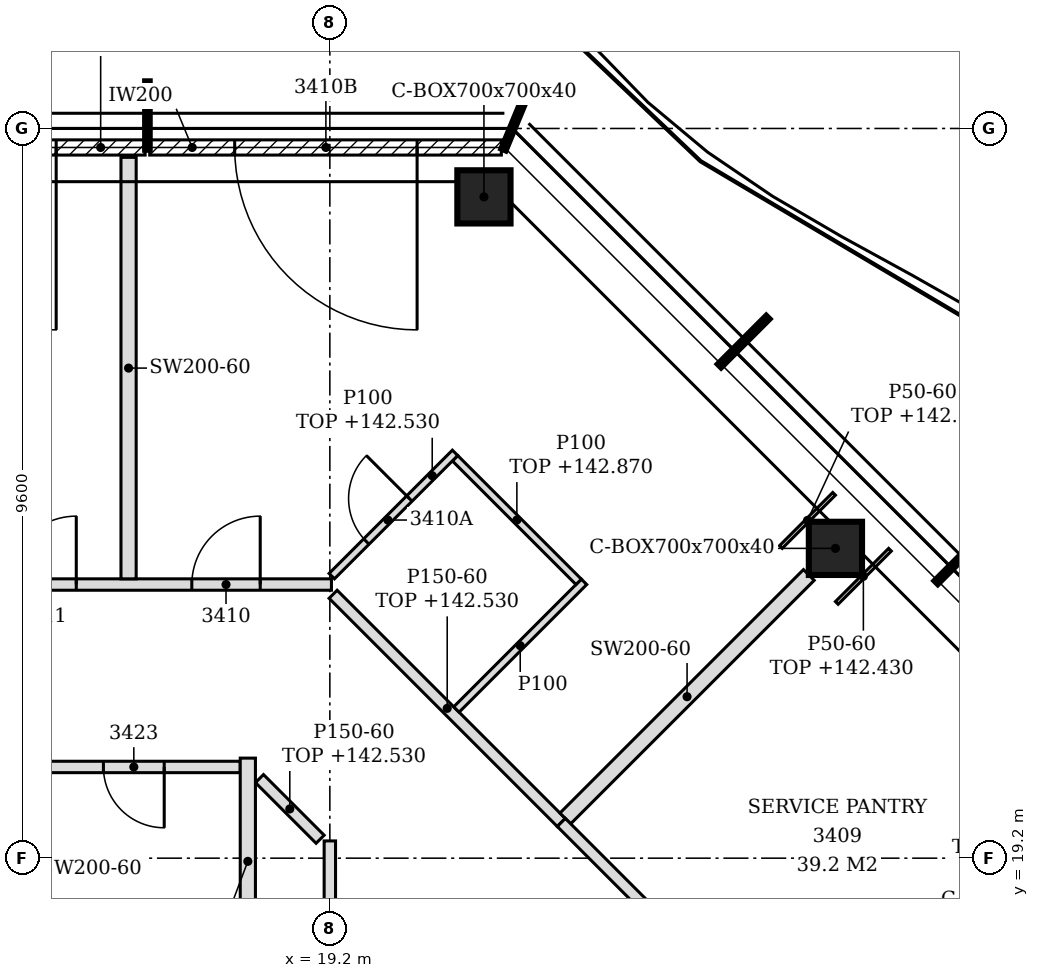
"""IFC4 building model, lengths in metres.
Left out: names, types, materials, properties, quantities, classifications, styles, units other than length and angle.
Written with IfcOpenShell. Run it as: python <this file> out.ifc"""

import sys

from ifc_helpers import new_model, si_unit, direction, frame, frame_2d, origin, origin_2d, place, context, subcontext, project, spatial, polyline, rectangle, hollow_rectangle, outline, extrude, element, fill, save


model = new_model("IFC4")
c1 = context("Model", 3, precision=1e-05, world=origin(), true_north=direction((0.0, 1.0)))
c2 = subcontext(c1, "Body", "Model", "MODEL_VIEW")
j1 = project(units=[si_unit("LENGTHUNIT", "METRE"), si_unit("PLANEANGLEUNIT", "RADIAN")], contexts=[c1])
p1 = place(None, origin())
s1 = spatial("IfcSite", under=j1, at=p1, CompositionType="ELEMENT")
p2 = place(p1, origin())
s2 = spatial("IfcBuilding", under=s1, at=p2, CompositionType="ELEMENT")
p3 = place(p2, frame((0.0, 0.0, 139.8)))
s3 = spatial("IfcBuildingStorey", under=s2, at=p3, CompositionType="ELEMENT", Elevation=139.8)
for number, where, z_axis, x_axis in (
    (1, (25.852, 23.276, -0.15), (0.0, 0.0, 1.0), (1.0, 0.0, 0.0)),
    (2, (21.227, 27.9, -0.15), (0.0, 0.0, 1.0), (1.0, 0.0, 0.0)),
):
    element("IfcColumn", number, at=place(p3, frame(where, z_axis=z_axis, x_axis=x_axis)), inside=s3, PredefinedType="COLUMN", context=c2, shape_type="SweptSolid", body=[
        extrude(hollow_rectangle(XDim=0.7, YDim=0.7, WallThickness=0.04, at=origin_2d()), origin(), (0.0, 0.0, 1.0), 3.6),
    ])
p4 = place(p3, frame((21.457, 28.55, 0.0), z_axis=(0.0, 0.0, 1.0), x_axis=(-1.0, 0.0, 0.0)))
e3 = element("IfcWall", 3, at=p4, inside=s3, PredefinedType="NOTDEFINED", context=c2, shape_type="SweptSolid", body=[
    extrude(rectangle(XDim=4.626, YDim=0.2, at=frame_2d((2.313, 0.0))), origin(), (0.0, 0.0, 1.0), 3.45),
])
p5 = place(p4, frame((1.108, 0.0, 0.0)))
e4 = element("IfcOpeningElement", 4, at=p5, cuts=e3, PredefinedType="OPENING", context=c2, shape_type="SweptSolid", body=[
    extrude(rectangle(XDim=2.4, YDim=2.4, at=frame_2d((1.2, 1.2))), frame((0.0, 0.11, 0.0), z_axis=(0.0, -1.0, 0.0), x_axis=(1.0, 0.0, 0.0)), (0.0, 0.0, 1.0), 0.22),
])
p6 = place(p3, frame((16.77, 28.55, 0.0), z_axis=(0.0, 0.0, 1.0), x_axis=(-1.0, 0.0, 0.0)))
e5 = element("IfcWall", 5, at=p6, inside=s3, PredefinedType="NOTDEFINED", context=c2, shape_type="SweptSolid", body=[
    extrude(rectangle(XDim=4.74, YDim=0.2, at=frame_2d((2.37, 0.0))), origin(), (0.0, 0.0, 1.0), 3.45),
])
p7 = place(p6, frame((1.17, 0.0, 0.0)))
e6 = element("IfcOpeningElement", 6, at=p7, cuts=e5, PredefinedType="OPENING", context=c2, shape_type="SweptSolid", body=[
    extrude(rectangle(XDim=2.4, YDim=2.4, at=frame_2d((1.2, 1.2))), frame((0.0, 0.11, 0.0), z_axis=(0.0, -1.0, 0.0), x_axis=(1.0, 0.0, 0.0)), (0.0, 0.0, 1.0), 0.22),
])
p8 = place(p3, frame((26.869, 15.045, 0.0), z_axis=(0.0, 0.0, 1.0), x_axis=(-0.707013447311, 0.707200102744, 0.0)))
e7 = element("IfcWall", 7, at=p8, inside=s3, PredefinedType="PARTITIONING", context=c2, shape_type="SweptSolid", body=[
    extrude(rectangle(XDim=6.54, YDim=0.15, at=frame_2d((3.27, 0.0))), origin(), (0.0, 0.0, 1.0), 2.93),
])
p9 = place(p8, frame((2.82, 0.0, 0.0)))
e8 = element("IfcOpeningElement", 8, at=p9, cuts=e7, PredefinedType="OPENING", context=c2, shape_type="SweptSolid", body=[
    extrude(rectangle(XDim=0.9, YDim=2.1, at=frame_2d((0.45, 1.05))), frame((0.0, 0.085, 0.0), z_axis=(0.0, -1.0, 0.0), x_axis=(1.0, 0.0, 0.0)), (0.0, 0.0, 1.0), 0.17),
])
p10 = place(p3, frame((19.2, 15.502, 0.0), z_axis=(0.0, 0.0, 1.0), x_axis=(0.0, 1.0, 0.0)))
e9 = element("IfcWall", 9, at=p10, inside=s3, PredefinedType="PARTITIONING", context=c2, shape_type="SweptSolid", body=[
    extrude(rectangle(XDim=3.925, YDim=0.15, at=frame_2d((1.962, 0.0))), origin(), (0.0, 0.0, 1.0), 2.73),
])
p11 = place(p3, frame((18.121, 17.8, 0.0), z_axis=(0.0, 0.0, 1.0), x_axis=(0.0, 1.0, 0.0)))
e10 = element("IfcWall", 10, at=p11, inside=s3, PredefinedType="PARTITIONING", context=c2, shape_type="SweptSolid", body=[
    extrude(outline(polyline([(0.0, 0.0), (2.716, 0.0), (2.716, 3.45), (1.505, 3.45), (1.503, 2.88), (1.295, 2.88), (1.293, 3.45), (0.0, 3.45), (0.0, 0.0)])), frame((0.0, 0.1, 0.0), z_axis=(0.0, -1.0, 0.0), x_axis=(1.0, 0.0, 0.0)), (0.0, 0.0, 1.0), 0.2),
])
p12 = place(p3, frame((19.072, 19.449, 0.0), z_axis=(0.0, 0.0, 1.0), x_axis=(-0.707106781187, 0.707106781187, 0.0)))
e11 = element("IfcWall", 11, at=p12, inside=s3, PredefinedType="PARTITIONING", context=c2, shape_type="SweptSolid", body=[
    extrude(rectangle(XDim=1.128, YDim=0.15, at=frame_2d((0.564, 0.0))), origin(), (0.0, 0.0, 1.0), 2.73),
])
p13 = place(p3, frame((22.245, 19.67, 0.0), z_axis=(0.0, 0.0, 1.0), x_axis=(-0.707106781187, 0.707106781187, 0.0)))
e12 = element("IfcWall", 12, at=p13, inside=s3, PredefinedType="PARTITIONING", context=c2, shape_type="SweptSolid", body=[
    extrude(rectangle(XDim=4.246, YDim=0.15, at=frame_2d((2.123, 0.0))), origin(), (0.0, 0.0, 1.0), 2.73),
])
p14 = place(p3, frame((22.298, 19.723, 0.0), z_axis=(0.0, 0.0, 1.0), x_axis=(0.707160674466, 0.707052883799, 0.0)))
e13 = element("IfcWall", 13, at=p14, inside=s3, PredefinedType="PARTITIONING", context=c2, shape_type="SweptSolid", body=[
    extrude(rectangle(XDim=4.53, YDim=0.2, at=frame_2d((2.265, 0.0))), origin(), (0.0, 0.0, 1.0), 3.45),
])
p15 = place(p3, frame((7.125, 20.4, 0.0), z_axis=(0.0, 0.0, 1.0), x_axis=(1.0, 0.0, 0.0)))
e14 = element("IfcWall", 14, at=p15, inside=s3, PredefinedType="PARTITIONING", context=c2, shape_type="SweptSolid", body=[
    extrude(outline(polyline([(0.0, 0.0), (10.896, 0.0), (10.896, 3.45), (0.225, 3.45), (0.223, 2.73), (0.0, 2.73), (0.0, 0.0)])), frame((0.0, 0.075, 0.0), z_axis=(0.0, -1.0, 0.0), x_axis=(1.0, 0.0, 0.0)), (0.0, 0.0, 1.0), 0.15),
])
p16 = place(p15, frame((9.096, 0.0, 0.0)))
e15 = element("IfcOpeningElement", 15, at=p16, cuts=e14, PredefinedType="OPENING", context=c2, shape_type="SweptSolid", body=[
    extrude(rectangle(XDim=0.8, YDim=2.1, at=frame_2d((0.4, 1.05))), frame((0.0, 0.085, 0.0), z_axis=(0.0, -1.0, 0.0), x_axis=(1.0, 0.0, 0.0)), (0.0, 0.0, 1.0), 0.17),
])
p17 = place(p3, frame((20.865, 21.156, 0.0), z_axis=(0.0, 0.0, 1.0), x_axis=(0.707106781187, 0.707106781187, 0.0)))
e16 = element("IfcWall", 16, at=p17, inside=s3, PredefinedType="PARTITIONING", context=c2, shape_type="SweptSolid", body=[
    extrude(rectangle(XDim=2.375, YDim=0.1, at=frame_2d((1.188, 0.0))), origin(), (0.0, 0.0, 1.0), 3.45),
])
p18 = place(p3, frame((-4.821, 22.8, 0.0), z_axis=(0.0, 0.0, 1.0), x_axis=(1.0, 0.0, 0.0)))
e17 = element("IfcWall", 17, at=p18, inside=s3, PredefinedType="PARTITIONING", context=c2, shape_type="SweptSolid", body=[
    extrude(outline(polyline([(0.0, 0.0), (24.042, 0.0), (24.042, 2.73), (23.871, 2.73), (23.869, 3.45), (12.171, 3.45), (12.169, 2.73), (11.871, 2.73), (11.869, 3.45), (0.171, 3.45), (0.169, 2.73), (0.0, 2.73), (0.0, 0.0)])), frame((0.0, 0.075, 0.0), z_axis=(0.0, -1.0, 0.0), x_axis=(1.0, 0.0, 0.0)), (0.0, 0.0, 1.0), 0.15),
])
p19 = place(p18, frame((22.205, 0.0, 0.0)))
e18 = element("IfcOpeningElement", 18, at=p19, cuts=e17, PredefinedType="OPENING", context=c2, shape_type="SweptSolid", body=[
    extrude(rectangle(XDim=0.9, YDim=2.1, at=frame_2d((0.45, 1.05))), frame((0.0, 0.085, 0.0), z_axis=(0.0, -1.0, 0.0), x_axis=(1.0, 0.0, 0.0)), (0.0, 0.0, 1.0), 0.17),
])
p20 = place(p18, frame((19.785, 0.0, 0.0)))
e19 = element("IfcOpeningElement", 19, at=p20, cuts=e17, PredefinedType="OPENING", context=c2, shape_type="SweptSolid", body=[
    extrude(rectangle(XDim=0.9, YDim=2.1, at=frame_2d((0.45, 1.05))), frame((0.0, 0.085, 0.0), z_axis=(0.0, -1.0, 0.0), x_axis=(1.0, 0.0, 0.0)), (0.0, 0.0, 1.0), 0.17),
])
p21 = place(p18, frame((15.109, 0.0, 0.0)))
e20 = element("IfcOpeningElement", 20, at=p21, cuts=e17, PredefinedType="OPENING", context=c2, shape_type="SweptSolid", body=[
    extrude(rectangle(XDim=0.9, YDim=2.1, at=frame_2d((0.45, 1.05))), frame((0.0, 0.085, 0.0), z_axis=(0.0, -1.0, 0.0), x_axis=(1.0, 0.0, 0.0)), (0.0, 0.0, 1.0), 0.17),
])
p22 = place(p18, frame((10.433, 0.0, 0.0)))
e21 = element("IfcOpeningElement", 21, at=p22, cuts=e17, PredefinedType="OPENING", context=c2, shape_type="SweptSolid", body=[
    extrude(rectangle(XDim=0.9, YDim=2.1, at=frame_2d((0.45, 1.05))), frame((0.0, 0.085, 0.0), z_axis=(0.0, -1.0, 0.0), x_axis=(1.0, 0.0, 0.0)), (0.0, 0.0, 1.0), 0.17),
])
p23 = place(p18, frame((5.757, 0.0, 0.0)))
e22 = element("IfcOpeningElement", 22, at=p23, cuts=e17, PredefinedType="OPENING", context=c2, shape_type="SweptSolid", body=[
    extrude(rectangle(XDim=0.9, YDim=2.1, at=frame_2d((0.45, 1.05))), frame((0.0, 0.085, 0.0), z_axis=(0.0, -1.0, 0.0), x_axis=(1.0, 0.0, 0.0)), (0.0, 0.0, 1.0), 0.17),
])
p24 = place(p18, frame((0.938, 0.0, 0.0)))
e23 = element("IfcOpeningElement", 23, at=p24, cuts=e17, PredefinedType="OPENING", context=c2, shape_type="SweptSolid", body=[
    extrude(rectangle(XDim=0.9, YDim=2.1, at=frame_2d((0.45, 1.05))), frame((0.0, 0.085, 0.0), z_axis=(0.0, -1.0, 0.0), x_axis=(1.0, 0.0, 0.0)), (0.0, 0.0, 1.0), 0.17),
])
p25 = place(p3, frame((22.474, 22.835, 0.0), z_axis=(0.0, 0.0, 1.0), x_axis=(-0.707106781187, 0.707106781187, 0.0)))
e24 = element("IfcWall", 24, at=p25, inside=s3, PredefinedType="PARTITIONING", context=c2, shape_type="SweptSolid", body=[
    extrude(rectangle(XDim=2.3, YDim=0.1, at=frame_2d((1.15, 0.0))), origin(), (0.0, 0.0, 1.0), 3.07),
])
p26 = place(p3, frame((16.552, 22.875, 0.0), z_axis=(0.0, 0.0, 1.0), x_axis=(0.0, 1.0, 0.0)))
e25 = element("IfcWall", 25, at=p26, inside=s3, PredefinedType="PARTITIONING", context=c2, shape_type="SweptSolid", body=[
    extrude(outline(polyline([(0.0, 0.0), (5.545, 0.0), (5.545, 3.45), (5.175, 3.45), (5.173, 2.93), (4.875, 2.93), (4.873, 3.45), (1.23, 3.45), (1.228, 2.88), (1.02, 2.88), (1.018, 3.45), (0.0, 3.45), (0.0, 0.0)])), frame((0.0, 0.1, 0.0), z_axis=(0.0, -1.0, 0.0), x_axis=(1.0, 0.0, 0.0)), (0.0, 0.0, 1.0), 0.2),
])
p27 = place(p3, frame((19.225, 22.91, 0.0), z_axis=(0.0, 0.0, 1.0), x_axis=(0.707106781187, 0.707106781187, 0.0)))
e26 = element("IfcWall", 26, at=p27, inside=s3, PredefinedType="PARTITIONING", context=c2, shape_type="SweptSolid", body=[
    extrude(rectangle(XDim=2.294, YDim=0.1, at=frame_2d((1.147, 0.0))), origin(), (0.0, 0.0, 1.0), 2.73),
])
p28 = place(p27, frame((0.644, 0.0, 0.0)))
e27 = element("IfcOpeningElement", 27, at=p28, cuts=e26, PredefinedType="OPENING", context=c2, shape_type="SweptSolid", body=[
    extrude(rectangle(XDim=0.8, YDim=2.1, at=frame_2d((0.4, 1.05))), frame((0.0, 0.06, 0.0), z_axis=(0.0, -1.0, 0.0), x_axis=(1.0, 0.0, 0.0)), (0.0, 0.0, 1.0), 0.12),
])
p29 = place(p3, frame((25.134, 23.293, 0.0), z_axis=(0.0, 0.0, 1.0), x_axis=(0.707230067171, 0.706983473703, 0.0)))
e28 = element("IfcWall", 28, at=p29, inside=s3, PredefinedType="PARTITIONING", context=c2, shape_type="SweptSolid", body=[
    extrude(rectangle(XDim=0.99, YDim=0.05, at=frame_2d((0.495, 0.0))), origin(), (0.0, 0.0, 1.0), 2.93),
])
p30 = place(p3, frame((25.869, 22.558, 0.0), z_axis=(0.0, 0.0, 1.0), x_axis=(0.707230110177, 0.706983430682, 0.0)))
e29 = element("IfcWall", 29, at=p30, inside=s3, PredefinedType="PARTITIONING", context=c2, shape_type="SweptSolid", body=[
    extrude(rectangle(XDim=0.99, YDim=0.05, at=frame_2d((0.495, 0.0))), origin(), (0.0, 0.0, 1.0), 2.63),
])
p31 = place(p5, origin())
e30 = element("IfcDoor", 30, at=p31, inside=s3, OperationType="SINGLE_SWING_LEFT", PredefinedType="DOOR", context=c2, shape_type="SweptSolid", body=[
    extrude(rectangle(XDim=2.4, YDim=2.4, at=frame_2d((1.2, 1.2))), frame((0.0, 0.025, 0.0), z_axis=(0.0, -1.0, 0.0), x_axis=(1.0, 0.0, 0.0)), (0.0, 0.0, 1.0), 0.05),
])
fill(e4, e30)
p32 = place(p7, origin())
e31 = element("IfcDoor", 31, at=p32, inside=s3, OperationType="SINGLE_SWING_LEFT", PredefinedType="DOOR", context=c2, shape_type="SweptSolid", body=[
    extrude(rectangle(XDim=2.4, YDim=2.4, at=frame_2d((1.2, 1.2))), frame((0.0, 0.025, 0.0), z_axis=(0.0, -1.0, 0.0), x_axis=(1.0, 0.0, 0.0)), (0.0, 0.0, 1.0), 0.05),
])
fill(e6, e31)
p33 = place(p19, origin())
e32 = element("IfcDoor", 32, at=p33, inside=s3, OperationType="SINGLE_SWING_RIGHT", PredefinedType="DOOR", context=c2, shape_type="SweptSolid", body=[
    extrude(rectangle(XDim=0.9, YDim=2.1, at=frame_2d((0.45, 1.05))), frame((0.0, 0.025, 0.0), z_axis=(0.0, -1.0, 0.0), x_axis=(1.0, 0.0, 0.0)), (0.0, 0.0, 1.0), 0.05),
])
fill(e18, e32)
p34 = place(p28, origin())
e33 = element("IfcDoor", 33, at=p34, inside=s3, OperationType="SINGLE_SWING_RIGHT", PredefinedType="DOOR", context=c2, shape_type="SweptSolid", body=[
    extrude(rectangle(XDim=0.8, YDim=2.1, at=frame_2d((0.4, 1.05))), frame((0.0, 0.025, 0.0), z_axis=(0.0, -1.0, 0.0), x_axis=(1.0, 0.0, 0.0)), (0.0, 0.0, 1.0), 0.05),
])
fill(e27, e33)
p35 = place(p20, origin())
e34 = element("IfcDoor", 34, at=p35, inside=s3, OperationType="SINGLE_SWING_RIGHT", PredefinedType="DOOR", context=c2, shape_type="SweptSolid", body=[
    extrude(rectangle(XDim=0.9, YDim=2.1, at=frame_2d((0.45, 1.05))), frame((0.0, 0.025, 0.0), z_axis=(0.0, -1.0, 0.0), x_axis=(1.0, 0.0, 0.0)), (0.0, 0.0, 1.0), 0.05),
])
fill(e19, e34)
p36 = place(p16, frame((0.8, 0.0, 0.0), z_axis=(0.0, 0.0, 1.0), x_axis=(-1.0, 0.0, 0.0)))
e35 = element("IfcDoor", 35, at=p36, inside=s3, OperationType="SINGLE_SWING_LEFT", PredefinedType="DOOR", context=c2, shape_type="SweptSolid", body=[
    extrude(rectangle(XDim=0.8, YDim=2.1, at=frame_2d((0.4, 1.05))), frame((0.0, 0.025, 0.0), z_axis=(0.0, -1.0, 0.0), x_axis=(1.0, 0.0, 0.0)), (0.0, 0.0, 1.0), 0.05),
])
fill(e15, e35)
save(model, sys.argv[1])
